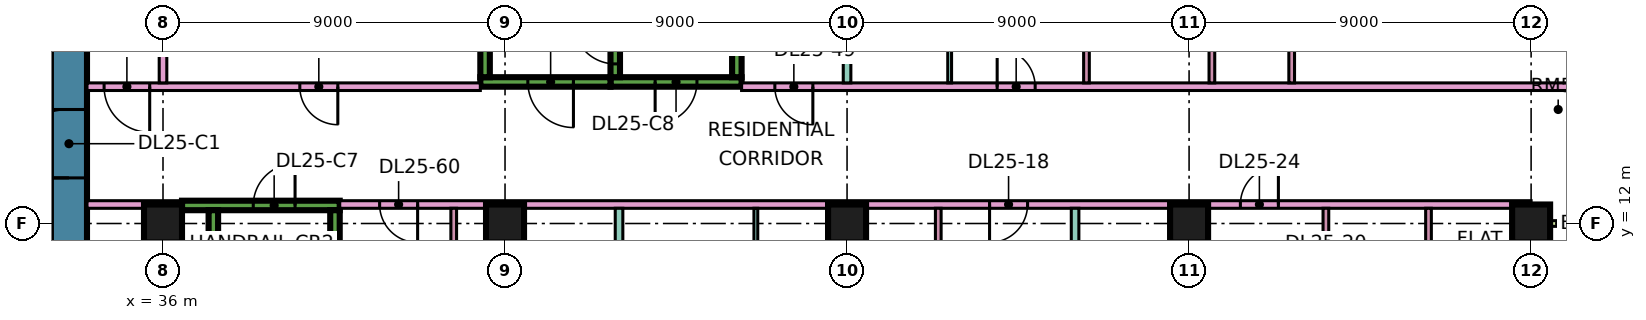
"""IFC4 building model, lengths in metres.
Left out: names, types, materials, properties, quantities, classifications, styles, units other than length and angle.
Written with IfcOpenShell. Run it as: python <this file> out.ifc"""

import sys

from ifc_helpers import new_model, si_unit, direction, frame, frame_2d, origin, origin_2d, place, context, subcontext, project, spatial, rectangle, extrude, element, fill, save


model = new_model("IFC4")
c1 = context("Model", 3, precision=1e-05, world=origin(), true_north=direction((0.0, 1.0)))
c2 = subcontext(c1, "Body", "Model", "MODEL_VIEW")
j1 = project(units=[si_unit("LENGTHUNIT", "METRE"), si_unit("PLANEANGLEUNIT", "RADIAN")], contexts=[c1])
p1 = place(None, origin())
s1 = spatial("IfcSite", under=j1, at=p1, CompositionType="ELEMENT")
p2 = place(p1, origin())
s2 = spatial("IfcBuilding", under=s1, at=p2, CompositionType="ELEMENT")
p3 = place(p2, frame((0.0, 0.0, 110.65)))
s3 = spatial("IfcBuildingStorey", under=s2, at=p3, CompositionType="ELEMENT", Elevation=110.65)
for number, where, z_axis, x_axis in (
    (1, (36.0, 12.0, 0.0), (0.0, 0.0, 1.0), (1.0, 0.0, 0.0)),
    (2, (45.0, 12.0, 0.0), (0.0, 0.0, 1.0), (1.0, 0.0, 0.0)),
    (3, (54.0, 12.0, 0.0), (0.0, 0.0, 1.0), (1.0, 0.0, 0.0)),
    (4, (63.0, 12.0, 0.0), (0.0, 0.0, 1.0), (1.0, 0.0, 0.0)),
    (5, (72.0, 12.0, 0.0), (0.0, 0.0, 1.0), (1.0, 0.0, 0.0)),
):
    element("IfcColumn", number, at=place(p3, frame(where, z_axis=z_axis, x_axis=x_axis)), inside=s3, PredefinedType="COLUMN", context=c2, shape_type="SweptSolid", body=[
        extrude(rectangle(XDim=1.0, YDim=1.0, at=origin_2d()), origin(), (0.0, 0.0, 1.0), 3.75),
    ])
p4 = place(p3, frame((33.525, 7.95, 0.0), z_axis=(0.0, 0.0, 1.0), x_axis=(0.0, 1.0, 0.0)))
e6 = element("IfcWall", 6, at=p4, inside=s3, PredefinedType="SHEAR", context=c2, shape_type="SweptSolid", body=[
    extrude(rectangle(XDim=11.1, YDim=0.95, at=frame_2d((5.55, 0.0))), origin(), (0.0, 0.0, 1.0), 3.75),
])
p5 = place(p4, frame((5.25, 0.0, 0.0)))
e7 = element("IfcOpeningElement", 7, at=p5, cuts=e6, PredefinedType="OPENING", context=c2, shape_type="SweptSolid", body=[
    extrude(rectangle(XDim=1.8, YDim=2.4, at=frame_2d((0.9, 1.2))), frame((0.0, 0.485, 0.0), z_axis=(0.0, -1.0, 0.0), x_axis=(1.0, 0.0, 0.0)), (0.0, 0.0, 1.0), 0.97),
])
p6 = place(p3, frame((36.5, 12.475, 0.0), z_axis=(0.0, 0.0, 1.0), x_axis=(1.0, 0.0, 0.0)))
e8 = element("IfcWall", 8, at=p6, inside=s3, PredefinedType="SHEAR", context=c2, shape_type="SweptSolid", body=[
    extrude(rectangle(XDim=4.15, YDim=0.25, at=frame_2d((2.075, 0.0))), origin(), (0.0, 0.0, 1.0), 3.75),
])
p7 = place(p6, frame((1.875, 0.0, 0.0)))
e9 = element("IfcOpeningElement", 9, at=p7, cuts=e8, PredefinedType="OPENING", context=c2, shape_type="SweptSolid", body=[
    extrude(rectangle(XDim=1.1, YDim=2.2, at=frame_2d((0.55, 1.1))), frame((0.0, 0.135, 0.0), z_axis=(0.0, -1.0, 0.0), x_axis=(1.0, 0.0, 0.0)), (0.0, 0.0, 1.0), 0.27),
])
for number, where, z_axis, x_axis in (
    (10, (37.325, 5.85, 0.0), (0.0, 0.0, 1.0), (0.0, 1.0, 0.0)),
    (11, (40.525, 5.85, 0.0), (0.0, 0.0, 1.0), (0.0, 1.0, 0.0)),
):
    element("IfcWall", number, at=place(p3, frame(where, z_axis=z_axis, x_axis=x_axis)), inside=s3, PredefinedType="SHEAR", context=c2, shape_type="SweptSolid", body=[
        extrude(rectangle(XDim=6.5, YDim=0.25, at=frame_2d((3.25, 0.0))), origin(), (0.0, 0.0, 1.0), 3.75),
    ])
p8 = place(p3, frame((47.775, 15.725, 0.0), z_axis=(0.0, 0.0, 1.0), x_axis=(1.0, 0.0, 0.0)))
e12 = element("IfcWall", 12, at=p8, inside=s3, PredefinedType="SHEAR", context=c2, shape_type="SweptSolid", body=[
    extrude(rectangle(XDim=3.45, YDim=0.25, at=frame_2d((1.725, 0.0))), origin(), (0.0, 0.0, 1.0), 3.75),
])
p9 = place(p8, frame((1.175, 0.0, 0.0)))
e13 = element("IfcOpeningElement", 13, at=p9, cuts=e12, PredefinedType="OPENING", context=c2, shape_type="SweptSolid", body=[
    extrude(rectangle(XDim=1.1, YDim=2.2, at=frame_2d((0.55, 1.1))), frame((0.0, 0.135, 0.0), z_axis=(0.0, -1.0, 0.0), x_axis=(1.0, 0.0, 0.0)), (0.0, 0.0, 1.0), 0.27),
])
p10 = place(p3, frame((47.9, 15.85, 0.0), z_axis=(0.0, 0.0, 1.0), x_axis=(0.0, 1.0, 0.0)))
e14 = element("IfcWall", 14, at=p10, inside=s3, PredefinedType="SHEAR", context=c2, shape_type="SweptSolid", body=[
    extrude(rectangle(XDim=6.5, YDim=0.25, at=frame_2d((3.25, 0.0))), origin(), (0.0, 0.0, 1.0), 3.75),
])
p11 = place(p10, frame((0.35, 0.0, 0.0)))
e15 = element("IfcOpeningElement", 15, at=p11, cuts=e14, PredefinedType="OPENING", context=c2, shape_type="SweptSolid", body=[
    extrude(rectangle(XDim=1.1, YDim=2.2, at=frame_2d((0.55, 1.1))), frame((0.0, 0.135, 0.0), z_axis=(0.0, -1.0, 0.0), x_axis=(1.0, 0.0, 0.0)), (0.0, 0.0, 1.0), 0.27),
])
p12 = place(p3, frame((51.1, 15.85, 0.0), z_axis=(0.0, 0.0, 1.0), x_axis=(0.0, 1.0, 0.0)))
e16 = element("IfcWall", 16, at=p12, inside=s3, PredefinedType="SHEAR", context=c2, shape_type="SweptSolid", body=[
    extrude(rectangle(XDim=6.5, YDim=0.25, at=frame_2d((3.25, 0.0))), origin(), (0.0, 0.0, 1.0), 3.75),
])
p13 = place(p3, frame((44.35, 15.725, 0.0), z_axis=(0.0, 0.0, 1.0), x_axis=(1.0, 0.0, 0.0)))
e17 = element("IfcWall", 17, at=p13, inside=s3, PredefinedType="SHEAR", context=c2, shape_type="SweptSolid", body=[
    extrude(rectangle(XDim=3.425, YDim=0.25, at=frame_2d((1.712, 0.0))), origin(), (0.0, 0.0, 1.0), 3.75),
])
p14 = place(p13, frame((1.25, 0.0, 0.0)))
e18 = element("IfcOpeningElement", 18, at=p14, cuts=e17, PredefinedType="OPENING", context=c2, shape_type="SweptSolid", body=[
    extrude(rectangle(XDim=1.2, YDim=2.2, at=frame_2d((0.6, 1.1))), frame((0.0, 0.135, 0.0), z_axis=(0.0, -1.0, 0.0), x_axis=(1.0, 0.0, 0.0)), (0.0, 0.0, 1.0), 0.27),
])
p15 = place(p3, frame((44.475, 15.85, 0.0), z_axis=(0.0, 0.0, 1.0), x_axis=(0.0, 1.0, 0.0)))
e19 = element("IfcWall", 19, at=p15, inside=s3, PredefinedType="SHEAR", context=c2, shape_type="SweptSolid", body=[
    extrude(rectangle(XDim=6.5, YDim=0.25, at=frame_2d((3.25, 0.0))), origin(), (0.0, 0.0, 1.0), 3.75),
])
p16 = place(p15, frame((1.75, 0.0, 0.0)))
e20 = element("IfcOpeningElement", 20, at=p16, cuts=e19, PredefinedType="OPENING", context=c2, shape_type="SweptSolid", body=[
    extrude(rectangle(XDim=1.1, YDim=2.2, at=frame_2d((0.55, 1.1))), frame((0.0, 0.135, 0.0), z_axis=(0.0, -1.0, 0.0), x_axis=(1.0, 0.0, 0.0)), (0.0, 0.0, 1.0), 0.27),
])
p17 = place(p15, frame((4.3, 0.0, 0.0)))
e21 = element("IfcOpeningElement", 21, at=p17, cuts=e19, PredefinedType="OPENING", context=c2, shape_type="SweptSolid", body=[
    extrude(rectangle(XDim=1.1, YDim=2.2, at=frame_2d((0.55, 1.1))), frame((0.0, 0.135, 0.0), z_axis=(0.0, -1.0, 0.0), x_axis=(1.0, 0.0, 0.0)), (0.0, 0.0, 1.0), 0.27),
])
p18 = place(p3, frame((72.0, 1.575, 0.0), z_axis=(0.0, 0.0, 1.0), x_axis=(0.0, 1.0, 0.0)))
e22 = element("IfcWall", 22, at=p18, inside=s3, PredefinedType="SOLIDWALL", context=c2, shape_type="SweptSolid", body=[
    extrude(rectangle(XDim=10.35, YDim=0.15, at=frame_2d((5.175, 0.0))), origin(), (0.0, 0.0, 1.0), 3.35),
])
p19 = place(p18, frame((2.462, 0.0, 0.0)))
e23 = element("IfcOpeningElement", 23, at=p19, cuts=e22, PredefinedType="OPENING", context=c2, shape_type="SweptSolid", body=[
    extrude(rectangle(XDim=1.8, YDim=2.4, at=frame_2d((0.9, 1.2))), frame((0.0, 0.085, 0.0), z_axis=(0.0, -1.0, 0.0), x_axis=(1.0, 0.0, 0.0)), (0.0, 0.0, 1.0), 0.17),
])
p20 = place(p3, frame((73.5, 12.0, 0.0), z_axis=(0.0, 0.0, 1.0), x_axis=(-1.0, 0.0, 0.0)))
e24 = element("IfcWall", 24, at=p20, inside=s3, PredefinedType="SOLIDWALL", context=c2, shape_type="SweptSolid", body=[
    extrude(rectangle(XDim=1.5, YDim=0.15, at=frame_2d((0.75, 0.0))), origin(), (0.0, 0.0, 1.0), 3.35),
])
p21 = place(p3, frame((34.0, 12.5, 0.0), z_axis=(0.0, 0.0, 1.0), x_axis=(1.0, 0.0, 0.0)))
e25 = element("IfcWall", 25, at=p21, inside=s3, PredefinedType="PARTITIONING", context=c2, shape_type="SweptSolid", body=[
    extrude(rectangle(XDim=2.501, YDim=0.2, at=frame_2d((1.25, 0.0))), origin(), (0.0, 0.0, 1.0), 3.35),
])
p22 = place(p3, frame((34.0, 15.6, 0.0), z_axis=(0.0, 0.0, 1.0), x_axis=(1.0, 0.0, 0.0)))
e26 = element("IfcWall", 26, at=p22, inside=s3, PredefinedType="PARTITIONING", context=c2, shape_type="SweptSolid", body=[
    extrude(rectangle(XDim=10.35, YDim=0.2, at=frame_2d((5.175, 0.0))), origin(), (0.0, 0.0, 1.0), 3.35),
])
p23 = place(p22, frame((5.6, 0.0, 0.0)))
e27 = element("IfcOpeningElement", 27, at=p23, cuts=e26, PredefinedType="OPENING", context=c2, shape_type="SweptSolid", body=[
    extrude(rectangle(XDim=1.0, YDim=2.1, at=frame_2d((0.5, 1.05))), frame((0.0, 0.11, 0.0), z_axis=(0.0, -1.0, 0.0), x_axis=(1.0, 0.0, 0.0)), (0.0, 0.0, 1.0), 0.22),
])
p24 = place(p22, frame((0.45, 0.0, 0.0)))
e28 = element("IfcOpeningElement", 28, at=p24, cuts=e26, PredefinedType="OPENING", context=c2, shape_type="SweptSolid", body=[
    extrude(rectangle(XDim=1.2, YDim=2.1, at=frame_2d((0.6, 1.05))), frame((0.0, 0.11, 0.0), z_axis=(0.0, -1.0, 0.0), x_axis=(1.0, 0.0, 0.0)), (0.0, 0.0, 1.0), 0.22),
])
p25 = place(p3, frame((36.0, 15.7, 0.0), z_axis=(0.0, 0.0, 1.0), x_axis=(0.0, 1.0, 0.0)))
e29 = element("IfcWall", 29, at=p25, inside=s3, PredefinedType="PARTITIONING", context=c2, shape_type="SweptSolid", body=[
    extrude(rectangle(XDim=8.3, YDim=0.2, at=frame_2d((4.15, 0.0))), origin(), (0.0, 0.0, 1.0), 3.35),
])
p26 = place(p3, frame((40.65, 12.5, 0.0), z_axis=(0.0, 0.0, 1.0), x_axis=(1.0, 0.0, 0.0)))
e30 = element("IfcWall", 30, at=p26, inside=s3, PredefinedType="PARTITIONING", context=c2, shape_type="SweptSolid", body=[
    extrude(rectangle(XDim=31.35, YDim=0.2, at=frame_2d((15.675, 0.0))), origin(), (0.0, 0.0, 1.0), 3.35),
])
p27 = place(p26, frame((17.1, 0.0, 0.0)))
e31 = element("IfcOpeningElement", 31, at=p27, cuts=e30, PredefinedType="OPENING", context=c2, shape_type="SweptSolid", body=[
    extrude(rectangle(XDim=1.0, YDim=2.1, at=frame_2d((0.5, 1.05))), frame((0.0, 0.11, 0.0), z_axis=(0.0, -1.0, 0.0), x_axis=(1.0, 0.0, 0.0)), (0.0, 0.0, 1.0), 0.22),
])
p28 = place(p26, frame((23.7, 0.0, 0.0)))
e32 = element("IfcOpeningElement", 32, at=p28, cuts=e30, PredefinedType="OPENING", context=c2, shape_type="SweptSolid", body=[
    extrude(rectangle(XDim=1.0, YDim=2.1, at=frame_2d((0.5, 1.05))), frame((0.0, 0.11, 0.0), z_axis=(0.0, -1.0, 0.0), x_axis=(1.0, 0.0, 0.0)), (0.0, 0.0, 1.0), 0.22),
])
p29 = place(p26, frame((1.05, 0.0, 0.0)))
e33 = element("IfcOpeningElement", 33, at=p29, cuts=e30, PredefinedType="OPENING", context=c2, shape_type="SweptSolid", body=[
    extrude(rectangle(XDim=1.0, YDim=2.1, at=frame_2d((0.5, 1.05))), frame((0.0, 0.11, 0.0), z_axis=(0.0, -1.0, 0.0), x_axis=(1.0, 0.0, 0.0)), (0.0, 0.0, 1.0), 0.22),
])
p30 = place(p3, frame((43.65, 5.825, 0.0), z_axis=(0.0, 0.0, 1.0), x_axis=(0.0, 1.0, 0.0)))
e34 = element("IfcWall", 34, at=p30, inside=s3, PredefinedType="PARTITIONING", context=c2, shape_type="SweptSolid", body=[
    extrude(rectangle(XDim=6.575, YDim=0.15, at=frame_2d((3.288, 0.0))), origin(), (0.0, 0.0, 1.0), 3.35),
])
p31 = place(p30, frame((4.425, 0.0, 0.0)))
e35 = element("IfcOpeningElement", 35, at=p31, cuts=e34, PredefinedType="OPENING", context=c2, shape_type="SweptSolid", body=[
    extrude(rectangle(XDim=0.9, YDim=2.1, at=frame_2d((0.45, 1.05))), frame((0.0, 0.085, 0.0), z_axis=(0.0, -1.0, 0.0), x_axis=(1.0, 0.0, 0.0)), (0.0, 0.0, 1.0), 0.17),
])
p32 = place(p3, frame((48.0, 0.0, 0.0), z_axis=(0.0, 0.0, 1.0), x_axis=(0.0, 1.0, 0.0)))
e36 = element("IfcWall", 36, at=p32, inside=s3, PredefinedType="PARTITIONING", context=c2, shape_type="SweptSolid", body=[
    extrude(rectangle(XDim=12.4, YDim=0.2, at=frame_2d((6.2, 0.0))), origin(), (0.0, 0.0, 1.0), 3.35),
])
p33 = place(p3, frame((51.225, 15.6, 0.0), z_axis=(0.0, 0.0, 1.0), x_axis=(1.0, 0.0, 0.0)))
e37 = element("IfcWall", 37, at=p33, inside=s3, PredefinedType="PARTITIONING", context=c2, shape_type="SweptSolid", body=[
    extrude(rectangle(XDim=22.125, YDim=0.2, at=frame_2d((11.062, 0.0))), origin(), (0.0, 0.0, 1.0), 3.35),
])
p34 = place(p33, frame((6.725, 0.0, 0.0)))
e38 = element("IfcOpeningElement", 38, at=p34, cuts=e37, PredefinedType="OPENING", context=c2, shape_type="SweptSolid", body=[
    extrude(rectangle(XDim=1.0, YDim=2.1, at=frame_2d((0.5, 1.05))), frame((0.0, 0.11, 0.0), z_axis=(0.0, -1.0, 0.0), x_axis=(1.0, 0.0, 0.0)), (0.0, 0.0, 1.0), 0.22),
])
p35 = place(p33, frame((0.875, 0.0, 0.0)))
e39 = element("IfcOpeningElement", 39, at=p35, cuts=e37, PredefinedType="OPENING", context=c2, shape_type="SweptSolid", body=[
    extrude(rectangle(XDim=1.0, YDim=2.1, at=frame_2d((0.5, 1.05))), frame((0.0, 0.11, 0.0), z_axis=(0.0, -1.0, 0.0), x_axis=(1.0, 0.0, 0.0)), (0.0, 0.0, 1.0), 0.22),
])
p36 = place(p3, frame((51.6, 7.175, 0.0), z_axis=(0.0, 0.0, 1.0), x_axis=(0.0, 1.0, 0.0)))
e40 = element("IfcWall", 40, at=p36, inside=s3, PredefinedType="PARTITIONING", context=c2, shape_type="SweptSolid", body=[
    extrude(rectangle(XDim=5.225, YDim=0.1, at=frame_2d((2.612, 0.0))), origin(), (0.0, 0.0, 1.0), 3.35),
])
p37 = place(p3, frame((54.0, 7.175, 0.0), z_axis=(0.0, 0.0, 1.0), x_axis=(0.0, 1.0, 0.0)))
e41 = element("IfcWall", 41, at=p37, inside=s3, PredefinedType="PARTITIONING", context=c2, shape_type="SweptSolid", body=[
    extrude(rectangle(XDim=5.225, YDim=0.15, at=frame_2d((2.612, 0.0))), origin(), (0.0, 0.0, 1.0), 3.35),
])
p38 = place(p3, frame((54.0, 15.7, 0.0), z_axis=(0.0, 0.0, 1.0), x_axis=(0.0, 1.0, 0.0)))
e42 = element("IfcWall", 42, at=p38, inside=s3, PredefinedType="PARTITIONING", context=c2, shape_type="SweptSolid", body=[
    extrude(rectangle(XDim=8.226, YDim=0.2, at=frame_2d((4.113, 0.0))), origin(), (0.0, 0.0, 1.0), 3.35),
])
p39 = place(p3, frame((56.4, 7.175, 0.0), z_axis=(0.0, 0.0, 1.0), x_axis=(0.0, 1.0, 0.0)))
e43 = element("IfcWall", 43, at=p39, inside=s3, PredefinedType="PARTITIONING", context=c2, shape_type="SweptSolid", body=[
    extrude(rectangle(XDim=5.225, YDim=0.15, at=frame_2d((2.612, 0.0))), origin(), (0.0, 0.0, 1.0), 3.35),
])
p40 = place(p3, frame((56.7, 15.7, 0.0), z_axis=(0.0, 0.0, 1.0), x_axis=(0.0, 1.0, 0.0)))
e44 = element("IfcWall", 44, at=p40, inside=s3, PredefinedType="PARTITIONING", context=c2, shape_type="SweptSolid", body=[
    extrude(rectangle(XDim=2.95, YDim=0.1, at=frame_2d((1.475, 0.0))), origin(), (0.0, 0.0, 1.0), 3.35),
])
p41 = place(p40, frame((0.95, 0.0, 0.0)))
e45 = element("IfcOpeningElement", 45, at=p41, cuts=e44, PredefinedType="OPENING", context=c2, shape_type="SweptSolid", body=[
    extrude(rectangle(XDim=0.9, YDim=2.1, at=frame_2d((0.45, 1.05))), frame((0.0, 0.06, 0.0), z_axis=(0.0, -1.0, 0.0), x_axis=(1.0, 0.0, 0.0)), (0.0, 0.0, 1.0), 0.12),
])
p42 = place(p3, frame((60.0, 0.0, 0.0), z_axis=(0.0, 0.0, 1.0), x_axis=(0.0, 1.0, 0.0)))
e46 = element("IfcWall", 46, at=p42, inside=s3, PredefinedType="PARTITIONING", context=c2, shape_type="SweptSolid", body=[
    extrude(rectangle(XDim=12.4, YDim=0.2, at=frame_2d((6.2, 0.0))), origin(), (0.0, 0.0, 1.0), 3.35),
])
p43 = place(p3, frame((60.3, 15.7, 0.0), z_axis=(0.0, 0.0, 1.0), x_axis=(0.0, 1.0, 0.0)))
e47 = element("IfcWall", 47, at=p43, inside=s3, PredefinedType="PARTITIONING", context=c2, shape_type="SweptSolid", body=[
    extrude(rectangle(XDim=2.825, YDim=0.15, at=frame_2d((1.413, 0.0))), origin(), (0.0, 0.0, 1.0), 3.35),
])
p44 = place(p43, frame((0.95, 0.0, 0.0)))
e48 = element("IfcOpeningElement", 48, at=p44, cuts=e47, PredefinedType="OPENING", context=c2, shape_type="SweptSolid", body=[
    extrude(rectangle(XDim=0.8, YDim=2.1, at=frame_2d((0.4, 1.05))), frame((0.0, 0.085, 0.0), z_axis=(0.0, -1.0, 0.0), x_axis=(1.0, 0.0, 0.0)), (0.0, 0.0, 1.0), 0.17),
])
p45 = place(p3, frame((63.0, 8.25, 0.0), z_axis=(0.0, 0.0, 1.0), x_axis=(0.0, 1.0, 0.0)))
e49 = element("IfcWall", 49, at=p45, inside=s3, PredefinedType="PARTITIONING", context=c2, shape_type="SweptSolid", body=[
    extrude(rectangle(XDim=4.15, YDim=0.1, at=frame_2d((2.075, 0.0))), origin(), (0.0, 0.0, 1.0), 3.35),
])
p46 = place(p45, frame((1.7, 0.0, 0.0)))
e50 = element("IfcOpeningElement", 50, at=p46, cuts=e49, PredefinedType="OPENING", context=c2, shape_type="SweptSolid", body=[
    extrude(rectangle(XDim=0.9, YDim=2.1, at=frame_2d((0.45, 1.05))), frame((0.0, 0.06, 0.0), z_axis=(0.0, -1.0, 0.0), x_axis=(1.0, 0.0, 0.0)), (0.0, 0.0, 1.0), 0.12),
])
for number, where, z_axis, x_axis in (
    (51, (63.6, 15.7, 0.0), (0.0, 0.0, 1.0), (0.0, 1.0, 0.0)),
    (52, (65.7, 15.7, 0.0), (0.0, 0.0, 1.0), (0.0, 1.0, 0.0)),
):
    element("IfcWall", number, at=place(p3, frame(where, z_axis=z_axis, x_axis=x_axis)), inside=s3, PredefinedType="PARTITIONING", context=c2, shape_type="SweptSolid", body=[
        extrude(rectangle(XDim=2.825, YDim=0.15, at=frame_2d((1.413, 0.0))), origin(), (0.0, 0.0, 1.0), 3.35),
    ])
p47 = place(p3, frame((66.6, 8.375, 0.0), z_axis=(0.0, 0.0, 1.0), x_axis=(0.0, 1.0, 0.0)))
e53 = element("IfcWall", 53, at=p47, inside=s3, PredefinedType="PARTITIONING", context=c2, shape_type="SweptSolid", body=[
    extrude(rectangle(XDim=4.025, YDim=0.15, at=frame_2d((2.012, 0.0))), origin(), (0.0, 0.0, 1.0), 3.35),
])
p48 = place(p47, frame((1.575, 0.0, 0.0)))
e54 = element("IfcOpeningElement", 54, at=p48, cuts=e53, PredefinedType="OPENING", context=c2, shape_type="SweptSolid", body=[
    extrude(rectangle(XDim=0.8, YDim=2.1, at=frame_2d((0.4, 1.05))), frame((0.0, 0.085, 0.0), z_axis=(0.0, -1.0, 0.0), x_axis=(1.0, 0.0, 0.0)), (0.0, 0.0, 1.0), 0.17),
])
p49 = place(p3, frame((69.3, 8.375, 0.0), z_axis=(0.0, 0.0, 1.0), x_axis=(0.0, 1.0, 0.0)))
e55 = element("IfcWall", 55, at=p49, inside=s3, PredefinedType="PARTITIONING", context=c2, shape_type="SweptSolid", body=[
    extrude(rectangle(XDim=4.025, YDim=0.15, at=frame_2d((2.012, 0.0))), origin(), (0.0, 0.0, 1.0), 3.35),
])
p50 = place(p5, origin())
e56 = element("IfcDoor", 56, at=p50, inside=s3, OperationType="DOUBLE_DOOR_SINGLE_SWING", PredefinedType="DOOR", context=c2, shape_type="SweptSolid", body=[
    extrude(rectangle(XDim=1.8, YDim=2.4, at=frame_2d((0.9, 1.2))), frame((0.0, 0.025, 0.0), z_axis=(0.0, -1.0, 0.0), x_axis=(1.0, 0.0, 0.0)), (0.0, 0.0, 1.0), 0.05),
])
fill(e7, e56)
p51 = place(p7, frame((1.1, 0.0, 0.0), z_axis=(0.0, 0.0, 1.0), x_axis=(-1.0, 0.0, 0.0)))
e57 = element("IfcDoor", 57, at=p51, inside=s3, OperationType="SINGLE_SWING_RIGHT", PredefinedType="DOOR", context=c2, shape_type="SweptSolid", body=[
    extrude(rectangle(XDim=1.1, YDim=2.2, at=frame_2d((0.55, 1.1))), frame((0.0, 0.025, 0.0), z_axis=(0.0, -1.0, 0.0), x_axis=(1.0, 0.0, 0.0)), (0.0, 0.0, 1.0), 0.05),
])
fill(e9, e57)
p52 = place(p9, frame((1.1, 0.0, 0.0), z_axis=(0.0, 0.0, 1.0), x_axis=(-1.0, 0.0, 0.0)))
e58 = element("IfcDoor", 58, at=p52, inside=s3, OperationType="SINGLE_SWING_LEFT", PredefinedType="DOOR", context=c2, shape_type="SweptSolid", body=[
    extrude(rectangle(XDim=1.1, YDim=2.2, at=frame_2d((0.55, 1.1))), frame((0.0, 0.025, 0.0), z_axis=(0.0, -1.0, 0.0), x_axis=(1.0, 0.0, 0.0)), (0.0, 0.0, 1.0), 0.05),
])
fill(e13, e58)
p53 = place(p14, origin())
e59 = element("IfcDoor", 59, at=p53, inside=s3, OperationType="SINGLE_SWING_RIGHT", PredefinedType="DOOR", context=c2, shape_type="SweptSolid", body=[
    extrude(rectangle(XDim=1.2, YDim=2.2, at=frame_2d((0.6, 1.1))), frame((0.0, 0.025, 0.0), z_axis=(0.0, -1.0, 0.0), x_axis=(1.0, 0.0, 0.0)), (0.0, 0.0, 1.0), 0.05),
])
fill(e18, e59)
p54 = place(p11, frame((1.1, 0.0, 0.0), z_axis=(0.0, 0.0, 1.0), x_axis=(-1.0, 0.0, 0.0)))
e60 = element("IfcDoor", 60, at=p54, inside=s3, OperationType="SINGLE_SWING_RIGHT", PredefinedType="DOOR", context=c2, shape_type="SweptSolid", body=[
    extrude(rectangle(XDim=1.1, YDim=2.2, at=frame_2d((0.55, 1.1))), frame((0.0, 0.025, 0.0), z_axis=(0.0, -1.0, 0.0), x_axis=(1.0, 0.0, 0.0)), (0.0, 0.0, 1.0), 0.05),
])
fill(e15, e60)
p55 = place(p23, origin())
e61 = element("IfcDoor", 61, at=p55, inside=s3, OperationType="SINGLE_SWING_RIGHT", PredefinedType="DOOR", context=c2, shape_type="SweptSolid", body=[
    extrude(rectangle(XDim=1.0, YDim=2.1, at=frame_2d((0.5, 1.05))), frame((0.0, 0.025, 0.0), z_axis=(0.0, -1.0, 0.0), x_axis=(1.0, 0.0, 0.0)), (0.0, 0.0, 1.0), 0.05),
])
fill(e27, e61)
p56 = place(p34, origin())
e62 = element("IfcDoor", 62, at=p56, inside=s3, OperationType="SINGLE_SWING_LEFT", PredefinedType="DOOR", context=c2, shape_type="SweptSolid", body=[
    extrude(rectangle(XDim=1.0, YDim=2.1, at=frame_2d((0.5, 1.05))), frame((0.0, 0.025, 0.0), z_axis=(0.0, -1.0, 0.0), x_axis=(1.0, 0.0, 0.0)), (0.0, 0.0, 1.0), 0.05),
])
fill(e38, e62)
p57 = place(p27, frame((1.0, 0.0, 0.0), z_axis=(0.0, 0.0, 1.0), x_axis=(-1.0, 0.0, 0.0)))
e63 = element("IfcDoor", 63, at=p57, inside=s3, OperationType="SINGLE_SWING_LEFT", PredefinedType="DOOR", context=c2, shape_type="SweptSolid", body=[
    extrude(rectangle(XDim=1.0, YDim=2.1, at=frame_2d((0.5, 1.05))), frame((0.0, 0.025, 0.0), z_axis=(0.0, -1.0, 0.0), x_axis=(1.0, 0.0, 0.0)), (0.0, 0.0, 1.0), 0.05),
])
fill(e31, e63)
p58 = place(p28, frame((1.0, 0.0, 0.0), z_axis=(0.0, 0.0, 1.0), x_axis=(-1.0, 0.0, 0.0)))
e64 = element("IfcDoor", 64, at=p58, inside=s3, OperationType="SINGLE_SWING_RIGHT", PredefinedType="DOOR", context=c2, shape_type="SweptSolid", body=[
    extrude(rectangle(XDim=1.0, YDim=2.1, at=frame_2d((0.5, 1.05))), frame((0.0, 0.025, 0.0), z_axis=(0.0, -1.0, 0.0), x_axis=(1.0, 0.0, 0.0)), (0.0, 0.0, 1.0), 0.05),
])
fill(e32, e64)
p59 = place(p24, origin())
e65 = element("IfcDoor", 65, at=p59, inside=s3, OperationType="SINGLE_SWING_RIGHT", PredefinedType="DOOR", context=c2, shape_type="SweptSolid", body=[
    extrude(rectangle(XDim=1.2, YDim=2.1, at=frame_2d((0.6, 1.05))), frame((0.0, 0.025, 0.0), z_axis=(0.0, -1.0, 0.0), x_axis=(1.0, 0.0, 0.0)), (0.0, 0.0, 1.0), 0.05),
])
fill(e28, e65)
p60 = place(p35, origin())
e66 = element("IfcDoor", 66, at=p60, inside=s3, OperationType="SINGLE_SWING_RIGHT", PredefinedType="DOOR", context=c2, shape_type="SweptSolid", body=[
    extrude(rectangle(XDim=1.0, YDim=2.1, at=frame_2d((0.5, 1.05))), frame((0.0, 0.025, 0.0), z_axis=(0.0, -1.0, 0.0), x_axis=(1.0, 0.0, 0.0)), (0.0, 0.0, 1.0), 0.05),
])
fill(e39, e66)
p61 = place(p29, origin())
e67 = element("IfcDoor", 67, at=p61, inside=s3, OperationType="SINGLE_SWING_RIGHT", PredefinedType="DOOR", context=c2, shape_type="SweptSolid", body=[
    extrude(rectangle(XDim=1.0, YDim=2.1, at=frame_2d((0.5, 1.05))), frame((0.0, 0.025, 0.0), z_axis=(0.0, -1.0, 0.0), x_axis=(1.0, 0.0, 0.0)), (0.0, 0.0, 1.0), 0.05),
])
fill(e33, e67)
save(model, sys.argv[1])
